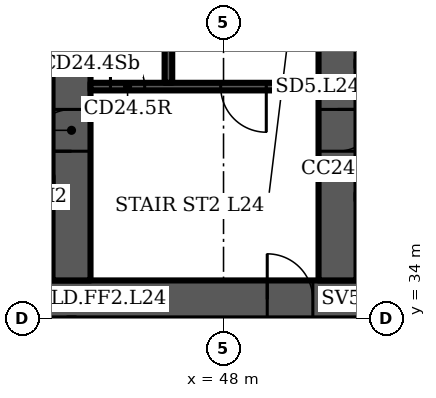
"""IFC4 building model, lengths in metres.
Left out: names, types, materials, properties, quantities, classifications, styles, units other than length and angle.
Written with IfcOpenShell. Run it as: python <this file> out.ifc"""

import sys

from ifc_helpers import new_model, si_unit, direction, frame, frame_2d, origin, place, context, subcontext, project, spatial, rectangle, extrude, element, fill, save


model = new_model("IFC4")
c1 = context("Model", 3, precision=1e-05, world=origin(), true_north=direction((0.0, 1.0)))
c2 = subcontext(c1, "Body", "Model", "MODEL_VIEW")
j1 = project(units=[si_unit("LENGTHUNIT", "METRE"), si_unit("PLANEANGLEUNIT", "RADIAN")], contexts=[c1])
p1 = place(None, origin())
s1 = spatial("IfcSite", under=j1, at=p1, CompositionType="ELEMENT")
p2 = place(p1, origin())
s2 = spatial("IfcBuilding", under=s1, at=p2, CompositionType="ELEMENT")
p3 = place(p2, frame((0.0, 0.0, 107.5)))
s3 = spatial("IfcBuildingStorey", under=s2, at=p3, CompositionType="ELEMENT", Elevation=107.5)
p4 = place(p3, frame((16.0, 34.5, 0.0), z_axis=(0.0, 0.0, 1.0), x_axis=(1.0, 0.0, 0.0)))
e1 = element("IfcWall", 1, at=p4, inside=s3, PredefinedType="SHEAR", context=c2, shape_type="SweptSolid", body=[
    extrude(rectangle(XDim=49.0, YDim=1.0, at=frame_2d((24.5, 0.0))), origin(), (0.0, 0.0, 1.0), 3.6),
])
p5 = place(p4, frame((1.2, 0.0, 0.0)))
e2 = element("IfcOpeningElement", 2, at=p5, cuts=e1, PredefinedType="OPENING", context=c2, shape_type="SweptSolid", body=[
    extrude(rectangle(XDim=1.1, YDim=2.1, at=frame_2d((0.55, 1.05))), frame((0.0, 0.51, 0.0), z_axis=(0.0, -1.0, 0.0), x_axis=(1.0, 0.0, 0.0)), (0.0, 0.0, 1.0), 1.02),
])
p6 = place(p4, frame((5.083, 0.0, 0.0)))
e3 = element("IfcOpeningElement", 3, at=p6, cuts=e1, PredefinedType="OPENING", context=c2, shape_type="SweptSolid", body=[
    extrude(rectangle(XDim=1.1, YDim=2.1, at=frame_2d((0.55, 1.05))), frame((0.0, 0.51, 0.0), z_axis=(0.0, -1.0, 0.0), x_axis=(1.0, 0.0, 0.0)), (0.0, 0.0, 1.0), 1.02),
])
p7 = place(p4, frame((2.933, 0.0, 0.0)))
e4 = element("IfcOpeningElement", 4, at=p7, cuts=e1, PredefinedType="OPENING", context=c2, shape_type="SweptSolid", body=[
    extrude(rectangle(XDim=1.4, YDim=2.1, at=frame_2d((0.7, 1.05))), frame((0.0, 0.51, 0.0), z_axis=(0.0, -1.0, 0.0), x_axis=(1.0, 0.0, 0.0)), (0.0, 0.0, 1.0), 1.02),
])
p8 = place(p4, frame((7.65, 0.0, 0.0)))
e5 = element("IfcOpeningElement", 5, at=p8, cuts=e1, PredefinedType="OPENING", context=c2, shape_type="SweptSolid", body=[
    extrude(rectangle(XDim=1.2, YDim=2.1, at=frame_2d((0.6, 1.05))), frame((0.0, 0.51, 0.0), z_axis=(0.0, -1.0, 0.0), x_axis=(1.0, 0.0, 0.0)), (0.0, 0.0, 1.0), 1.02),
])
p9 = place(p4, frame((14.817, 0.0, 0.0)))
e6 = element("IfcOpeningElement", 6, at=p9, cuts=e1, PredefinedType="OPENING", context=c2, shape_type="SweptSolid", body=[
    extrude(rectangle(XDim=1.1, YDim=2.1, at=frame_2d((0.55, 1.05))), frame((0.0, 0.51, 0.0), z_axis=(0.0, -1.0, 0.0), x_axis=(1.0, 0.0, 0.0)), (0.0, 0.0, 1.0), 1.02),
])
p10 = place(p4, frame((19.083, 0.0, 0.0)))
e7 = element("IfcOpeningElement", 7, at=p10, cuts=e1, PredefinedType="OPENING", context=c2, shape_type="SweptSolid", body=[
    extrude(rectangle(XDim=1.1, YDim=2.1, at=frame_2d((0.55, 1.05))), frame((0.0, 0.51, 0.0), z_axis=(0.0, -1.0, 0.0), x_axis=(1.0, 0.0, 0.0)), (0.0, 0.0, 1.0), 1.02),
])
p11 = place(p4, frame((16.8, 0.0, 0.0)))
e8 = element("IfcOpeningElement", 8, at=p11, cuts=e1, PredefinedType="OPENING", context=c2, shape_type="SweptSolid", body=[
    extrude(rectangle(XDim=1.4, YDim=2.1, at=frame_2d((0.7, 1.05))), frame((0.0, 0.51, 0.0), z_axis=(0.0, -1.0, 0.0), x_axis=(1.0, 0.0, 0.0)), (0.0, 0.0, 1.0), 1.02),
])
p12 = place(p4, frame((21.817, 0.0, 0.0)))
e9 = element("IfcOpeningElement", 9, at=p12, cuts=e1, PredefinedType="OPENING", context=c2, shape_type="SweptSolid", body=[
    extrude(rectangle(XDim=1.1, YDim=2.1, at=frame_2d((0.55, 1.05))), frame((0.0, 0.51, 0.0), z_axis=(0.0, -1.0, 0.0), x_axis=(1.0, 0.0, 0.0)), (0.0, 0.0, 1.0), 1.02),
])
p13 = place(p4, frame((26.083, 0.0, 0.0)))
e10 = element("IfcOpeningElement", 10, at=p13, cuts=e1, PredefinedType="OPENING", context=c2, shape_type="SweptSolid", body=[
    extrude(rectangle(XDim=1.1, YDim=2.1, at=frame_2d((0.55, 1.05))), frame((0.0, 0.51, 0.0), z_axis=(0.0, -1.0, 0.0), x_axis=(1.0, 0.0, 0.0)), (0.0, 0.0, 1.0), 1.02),
])
p14 = place(p4, frame((33.15, 0.0, 0.0)))
e11 = element("IfcOpeningElement", 11, at=p14, cuts=e1, PredefinedType="OPENING", context=c2, shape_type="SweptSolid", body=[
    extrude(rectangle(XDim=1.2, YDim=2.1, at=frame_2d((0.6, 1.05))), frame((0.0, 0.51, 0.0), z_axis=(0.0, -1.0, 0.0), x_axis=(1.0, 0.0, 0.0)), (0.0, 0.0, 1.0), 1.02),
])
p15 = place(p4, frame((37.8, 0.0, 0.0)))
e12 = element("IfcOpeningElement", 12, at=p15, cuts=e1, PredefinedType="OPENING", context=c2, shape_type="SweptSolid", body=[
    extrude(rectangle(XDim=1.4, YDim=2.1, at=frame_2d((0.7, 1.05))), frame((0.0, 0.51, 0.0), z_axis=(0.0, -1.0, 0.0), x_axis=(1.0, 0.0, 0.0)), (0.0, 0.0, 1.0), 1.02),
])
p16 = place(p4, frame((42.817, 0.0, 0.0)))
e13 = element("IfcOpeningElement", 13, at=p16, cuts=e1, PredefinedType="OPENING", context=c2, shape_type="SweptSolid", body=[
    extrude(rectangle(XDim=1.1, YDim=2.1, at=frame_2d((0.55, 1.05))), frame((0.0, 0.51, 0.0), z_axis=(0.0, -1.0, 0.0), x_axis=(1.0, 0.0, 0.0)), (0.0, 0.0, 1.0), 1.02),
])
p17 = place(p4, frame((46.7, 0.0, 0.0)))
e14 = element("IfcOpeningElement", 14, at=p17, cuts=e1, PredefinedType="OPENING", context=c2, shape_type="SweptSolid", body=[
    extrude(rectangle(XDim=1.1, YDim=2.1, at=frame_2d((0.55, 1.05))), frame((0.0, 0.51, 0.0), z_axis=(0.0, -1.0, 0.0), x_axis=(1.0, 0.0, 0.0)), (0.0, 0.0, 1.0), 1.02),
])
p18 = place(p4, frame((44.667, 0.0, 0.0)))
e15 = element("IfcOpeningElement", 15, at=p18, cuts=e1, PredefinedType="OPENING", context=c2, shape_type="SweptSolid", body=[
    extrude(rectangle(XDim=1.4, YDim=2.1, at=frame_2d((0.7, 1.05))), frame((0.0, 0.51, 0.0), z_axis=(0.0, -1.0, 0.0), x_axis=(1.0, 0.0, 0.0)), (0.0, 0.0, 1.0), 1.02),
])
p19 = place(p3, frame((44.0, 35.0, 0.0), z_axis=(0.0, 0.0, 1.0), x_axis=(0.0, 1.0, 0.0)))
e16 = element("IfcWall", 16, at=p19, inside=s3, PredefinedType="SHEAR", context=c2, shape_type="SweptSolid", body=[
    extrude(rectangle(XDim=14.577, YDim=1.0, at=frame_2d((7.289, 0.0))), origin(), (0.0, 0.0, 1.0), 3.6),
])
p20 = place(p19, frame((3.4, 0.0, 0.0)))
e17 = element("IfcOpeningElement", 17, at=p20, cuts=e16, PredefinedType="OPENING", context=c2, shape_type="SweptSolid", body=[
    extrude(rectangle(XDim=1.1, YDim=2.1, at=frame_2d((0.55, 1.05))), frame((0.0, 0.51, 0.0), z_axis=(0.0, -1.0, 0.0), x_axis=(1.0, 0.0, 0.0)), (0.0, 0.0, 1.0), 1.02),
])
p21 = place(p19, frame((9.8, 0.0, 0.0)))
e18 = element("IfcOpeningElement", 18, at=p21, cuts=e16, PredefinedType="OPENING", context=c2, shape_type="SweptSolid", body=[
    extrude(rectangle(XDim=1.0, YDim=2.1, at=frame_2d((0.5, 1.05))), frame((0.0, 0.51, 0.0), z_axis=(0.0, -1.0, 0.0), x_axis=(1.0, 0.0, 0.0)), (0.0, 0.0, 1.0), 1.02),
])
p22 = place(p3, frame((51.0, 35.0, 0.0), z_axis=(0.0, 0.0, 1.0), x_axis=(0.0, 1.0, 0.0)))
e19 = element("IfcWall", 19, at=p22, inside=s3, PredefinedType="SHEAR", context=c2, shape_type="SweptSolid", body=[
    extrude(rectangle(XDim=13.965, YDim=1.0, at=frame_2d((6.982, 0.0))), origin(), (0.0, 0.0, 1.0), 3.6),
])
p23 = place(p22, frame((3.4, 0.0, 0.0)))
e20 = element("IfcOpeningElement", 20, at=p23, cuts=e19, PredefinedType="OPENING", context=c2, shape_type="SweptSolid", body=[
    extrude(rectangle(XDim=1.1, YDim=2.1, at=frame_2d((0.55, 1.05))), frame((0.0, 0.51, 0.0), z_axis=(0.0, -1.0, 0.0), x_axis=(1.0, 0.0, 0.0)), (0.0, 0.0, 1.0), 1.02),
])
p24 = place(p3, frame((44.5, 40.1, 0.0), z_axis=(0.0, 0.0, 1.0), x_axis=(1.0, 0.0, 0.0)))
e21 = element("IfcWall", 21, at=p24, inside=s3, PredefinedType="SHEAR", context=c2, shape_type="SweptSolid", body=[
    extrude(rectangle(XDim=6.0, YDim=0.2, at=frame_2d((3.0, 0.0))), origin(), (0.0, 0.0, 1.0), 3.2),
])
p25 = place(p24, frame((3.425, 0.0, 0.0)))
e22 = element("IfcOpeningElement", 22, at=p25, cuts=e21, PredefinedType="OPENING", context=c2, shape_type="SweptSolid", body=[
    extrude(rectangle(XDim=1.2, YDim=2.1, at=frame_2d((0.6, 1.05))), frame((0.0, 0.11, 0.0), z_axis=(0.0, -1.0, 0.0), x_axis=(1.0, 0.0, 0.0)), (0.0, 0.0, 1.0), 0.22),
])
p26 = place(p24, frame((0.525, 0.0, 0.0)))
e23 = element("IfcOpeningElement", 23, at=p26, cuts=e21, PredefinedType="OPENING", context=c2, shape_type="SweptSolid", body=[
    extrude(rectangle(XDim=0.9, YDim=2.1, at=frame_2d((0.45, 1.05))), frame((0.0, 0.11, 0.0), z_axis=(0.0, -1.0, 0.0), x_axis=(1.0, 0.0, 0.0)), (0.0, 0.0, 1.0), 0.22),
])
p27 = place(p3, frame((46.55, 40.2, 0.0), z_axis=(0.0, 0.0, 1.0), x_axis=(0.0, 1.0, 0.0)))
e24 = element("IfcWall", 24, at=p27, inside=s3, PredefinedType="SHEAR", context=c2, shape_type="SweptSolid", body=[
    extrude(rectangle(XDim=7.2, YDim=0.2, at=frame_2d((3.6, 0.0))), origin(), (0.0, 0.0, 1.0), 3.2),
])
p28 = place(p25, origin())
e25 = element("IfcDoor", 25, at=p28, inside=s3, OperationType="SINGLE_SWING_RIGHT", PredefinedType="DOOR", context=c2, shape_type="SweptSolid", body=[
    extrude(rectangle(XDim=1.2, YDim=2.1, at=frame_2d((0.6, 1.05))), frame((0.0, 0.025, 0.0), z_axis=(0.0, -1.0, 0.0), x_axis=(1.0, 0.0, 0.0)), (0.0, 0.0, 1.0), 0.05),
])
fill(e22, e25)
p29 = place(p26, origin())
e26 = element("IfcDoor", 26, at=p29, inside=s3, OperationType="SINGLE_SWING_LEFT", PredefinedType="DOOR", context=c2, shape_type="SweptSolid", body=[
    extrude(rectangle(XDim=0.9, YDim=2.1, at=frame_2d((0.45, 1.05))), frame((0.0, 0.025, 0.0), z_axis=(0.0, -1.0, 0.0), x_axis=(1.0, 0.0, 0.0)), (0.0, 0.0, 1.0), 0.05),
])
fill(e23, e26)
p30 = place(p14, origin())
e27 = element("IfcDoor", 27, at=p30, inside=s3, OperationType="SINGLE_SWING_LEFT", PredefinedType="DOOR", context=c2, shape_type="SweptSolid", body=[
    extrude(rectangle(XDim=1.2, YDim=2.1, at=frame_2d((0.6, 1.05))), frame((0.0, 0.025, 0.0), z_axis=(0.0, -1.0, 0.0), x_axis=(1.0, 0.0, 0.0)), (0.0, 0.0, 1.0), 0.05),
])
fill(e11, e27)
p31 = place(p20, origin())
e28 = element("IfcDoor", 28, at=p31, inside=s3, OperationType="SINGLE_SWING_LEFT", PredefinedType="DOOR", context=c2, shape_type="SweptSolid", body=[
    extrude(rectangle(XDim=1.1, YDim=2.1, at=frame_2d((0.55, 1.05))), frame((0.0, 0.025, 0.0), z_axis=(0.0, -1.0, 0.0), x_axis=(1.0, 0.0, 0.0)), (0.0, 0.0, 1.0), 0.05),
])
fill(e17, e28)
p32 = place(p23, origin())
e29 = element("IfcDoor", 29, at=p32, inside=s3, OperationType="SINGLE_SWING_RIGHT", PredefinedType="DOOR", context=c2, shape_type="SweptSolid", body=[
    extrude(rectangle(XDim=1.1, YDim=2.1, at=frame_2d((0.55, 1.05))), frame((0.0, 0.025, 0.0), z_axis=(0.0, -1.0, 0.0), x_axis=(1.0, 0.0, 0.0)), (0.0, 0.0, 1.0), 0.05),
])
fill(e20, e29)
save(model, sys.argv[1])
